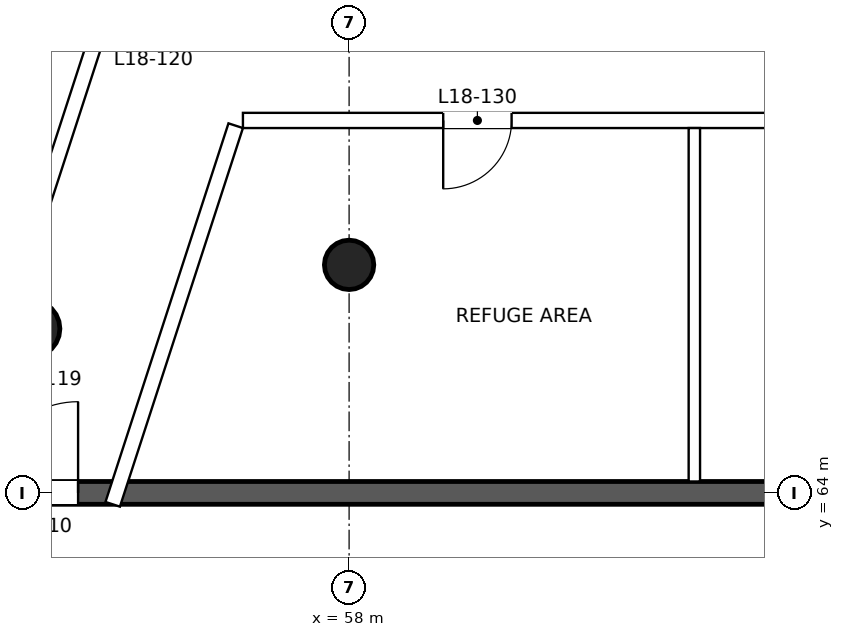
"""IFC4 building model, lengths in metres.
Left out: names, types, materials, properties, quantities, classifications, styles, units other than length and angle.
Written with IfcOpenShell. Run it as: python <this file> out.ifc"""

import sys

from ifc_helpers import new_model, si_unit, direction, frame, frame_2d, origin, origin_2d, place, context, subcontext, project, spatial, rectangle, circle, extrude, element, fill, save


model = new_model("IFC4")
c1 = context("Model", 3, precision=1e-05, world=origin(), true_north=direction((0.0, 1.0)))
c2 = subcontext(c1, "Body", "Model", "MODEL_VIEW")
j1 = project(units=[si_unit("LENGTHUNIT", "METRE"), si_unit("PLANEANGLEUNIT", "RADIAN")], contexts=[c1])
p1 = place(None, origin())
s1 = spatial("IfcSite", under=j1, at=p1, CompositionType="ELEMENT")
p2 = place(p1, origin())
s2 = spatial("IfcBuilding", under=s1, at=p2, CompositionType="ELEMENT")
p3 = place(p2, frame((0.0, 0.0, 85.8)))
s3 = spatial("IfcBuildingStorey", under=s2, at=p3, CompositionType="ELEMENT", Elevation=85.8)
p4 = place(p3, frame((53.82, 66.16, 0.0), z_axis=(0.0, 0.0, 1.0), x_axis=(1.0, 0.0, 0.0)))
e1 = element("IfcColumn", 1, at=p4, inside=s3, PredefinedType="COLUMN", context=c2, shape_type="SweptSolid", body=[
    extrude(circle(Radius=0.375, at=origin_2d()), origin(), (0.0, 0.0, 1.0), 5.0),
])
p5 = place(p3, frame((58.0, 67.0, 0.0), z_axis=(0.0, 0.0, 1.0), x_axis=(1.0, 0.0, 0.0)))
e2 = element("IfcColumn", 2, at=p5, inside=s3, PredefinedType="COLUMN", context=c2, shape_type="SweptSolid", body=[
    extrude(circle(Radius=0.325, at=origin_2d()), origin(), (0.0, 0.0, 1.0), 5.0),
])
p6 = place(p3, frame((45.286, 64.0, 0.0), z_axis=(0.0, 0.0, 1.0), x_axis=(1.0, 0.0, 0.0)))
e3 = element("IfcWall", 3, at=p6, inside=s3, PredefinedType="PARTITIONING", context=c2, shape_type="SweptSolid", body=[
    extrude(rectangle(XDim=49.428, YDim=0.3, at=frame_2d((24.714, 0.0))), origin(), (0.0, 0.0, 1.0), 3.7),
])
p7 = place(p6, frame((7.948, 0.0, 0.0)))
e4 = element("IfcOpeningElement", 4, at=p7, cuts=e3, PredefinedType="OPENING", context=c2, shape_type="SweptSolid", body=[
    extrude(rectangle(XDim=1.2, YDim=2.1, at=frame_2d((0.6, 1.05))), frame((0.0, 0.16, 0.0), z_axis=(0.0, -1.0, 0.0), x_axis=(1.0, 0.0, 0.0)), (0.0, 0.0, 1.0), 0.32),
])
p8 = place(p6, frame((24.114, 0.0, 0.0)))
e5 = element("IfcOpeningElement", 5, at=p8, cuts=e3, PredefinedType="OPENING", context=c2, shape_type="SweptSolid", body=[
    extrude(rectangle(XDim=1.2, YDim=2.1, at=frame_2d((0.6, 1.05))), frame((0.0, 0.16, 0.0), z_axis=(0.0, -1.0, 0.0), x_axis=(1.0, 0.0, 0.0)), (0.0, 0.0, 1.0), 0.32),
])
p9 = place(p6, frame((40.28, 0.0, 0.0)))
e6 = element("IfcOpeningElement", 6, at=p9, cuts=e3, PredefinedType="OPENING", context=c2, shape_type="SweptSolid", body=[
    extrude(rectangle(XDim=1.2, YDim=2.1, at=frame_2d((0.6, 1.05))), frame((0.0, 0.16, 0.0), z_axis=(0.0, -1.0, 0.0), x_axis=(1.0, 0.0, 0.0)), (0.0, 0.0, 1.0), 0.32),
])
p10 = place(p3, frame((52.681, 63.85, 0.0), z_axis=(0.0, 0.0, 1.0), x_axis=(0.309020889227, 0.951055250772, 0.0)))
e7 = element("IfcWall", 7, at=p10, inside=s3, PredefinedType="PARTITIONING", context=c2, shape_type="SweptSolid", body=[
    extrude(rectangle(XDim=13.635, YDim=0.2, at=frame_2d((6.818, 0.0))), origin(), (0.0, 0.0, 1.0), 4.7),
])
p11 = place(p10, frame((0.951, 0.0, 0.0)))
e8 = element("IfcOpeningElement", 8, at=p11, cuts=e7, PredefinedType="OPENING", context=c2, shape_type="SweptSolid", body=[
    extrude(rectangle(XDim=0.9, YDim=2.1, at=frame_2d((0.45, 1.05))), frame((0.0, 0.11, 0.0), z_axis=(0.0, -1.0, 0.0), x_axis=(1.0, 0.0, 0.0)), (0.0, 0.0, 1.0), 0.22),
])
p12 = place(p10, frame((6.368, 0.0, 0.0)))
e9 = element("IfcOpeningElement", 9, at=p12, cuts=e7, PredefinedType="OPENING", context=c2, shape_type="SweptSolid", body=[
    extrude(rectangle(XDim=0.9, YDim=2.1, at=frame_2d((0.45, 1.05))), frame((0.0, 0.11, 0.0), z_axis=(0.0, -1.0, 0.0), x_axis=(1.0, 0.0, 0.0)), (0.0, 0.0, 1.0), 0.22),
])
p13 = place(p3, frame((68.85, 68.9, 0.0), z_axis=(0.0, 0.0, 1.0), x_axis=(-1.0, 0.0, 0.0)))
e10 = element("IfcWall", 10, at=p13, inside=s3, PredefinedType="PARTITIONING", context=c2, shape_type="SweptSolid", body=[
    extrude(rectangle(XDim=12.247, YDim=0.2, at=frame_2d((6.124, 0.0))), origin(), (0.0, 0.0, 1.0), 4.7),
])
p14 = place(p13, frame((8.712, 0.0, 0.0)))
e11 = element("IfcOpeningElement", 11, at=p14, cuts=e10, PredefinedType="OPENING", context=c2, shape_type="SweptSolid", body=[
    extrude(rectangle(XDim=0.9, YDim=2.1, at=frame_2d((0.45, 1.05))), frame((0.0, 0.11, 0.0), z_axis=(0.0, -1.0, 0.0), x_axis=(1.0, 0.0, 0.0)), (0.0, 0.0, 1.0), 0.22),
])
p15 = place(p3, frame((56.508, 68.831, 0.0), z_axis=(0.0, 0.0, 1.0), x_axis=(-0.309030204086, -0.951052224099, 0.0)))
e12 = element("IfcWall", 12, at=p15, inside=s3, PredefinedType="PARTITIONING", context=c2, shape_type="SweptSolid", body=[
    extrude(rectangle(XDim=5.237, YDim=0.2, at=frame_2d((2.619, 0.0))), origin(), (0.0, 0.0, 1.0), 4.7),
])
p16 = place(p3, frame((62.542, 64.15, 0.0), z_axis=(0.0, 0.0, 1.0), x_axis=(0.0, 1.0, 0.0)))
e13 = element("IfcWall", 13, at=p16, inside=s3, PredefinedType="PARTITIONING", context=c2, shape_type="SweptSolid", body=[
    extrude(rectangle(XDim=4.65, YDim=0.15, at=frame_2d((2.325, 0.0))), origin(), (0.0, 0.0, 1.0), 4.7),
])
p17 = place(p7, origin())
e14 = element("IfcDoor", 14, at=p17, inside=s3, OperationType="SINGLE_SWING_RIGHT", PredefinedType="DOOR", context=c2, shape_type="SweptSolid", body=[
    extrude(rectangle(XDim=1.2, YDim=2.1, at=frame_2d((0.6, 1.05))), frame((0.0, 0.025, 0.0), z_axis=(0.0, -1.0, 0.0), x_axis=(1.0, 0.0, 0.0)), (0.0, 0.0, 1.0), 0.05),
])
fill(e4, e14)
p18 = place(p14, origin())
e15 = element("IfcDoor", 15, at=p18, inside=s3, OperationType="SINGLE_SWING_RIGHT", PredefinedType="DOOR", context=c2, shape_type="SweptSolid", body=[
    extrude(rectangle(XDim=0.9, YDim=2.1, at=frame_2d((0.45, 1.05))), frame((0.0, 0.025, 0.0), z_axis=(0.0, -1.0, 0.0), x_axis=(1.0, 0.0, 0.0)), (0.0, 0.0, 1.0), 0.05),
])
fill(e11, e15)
save(model, sys.argv[1])
